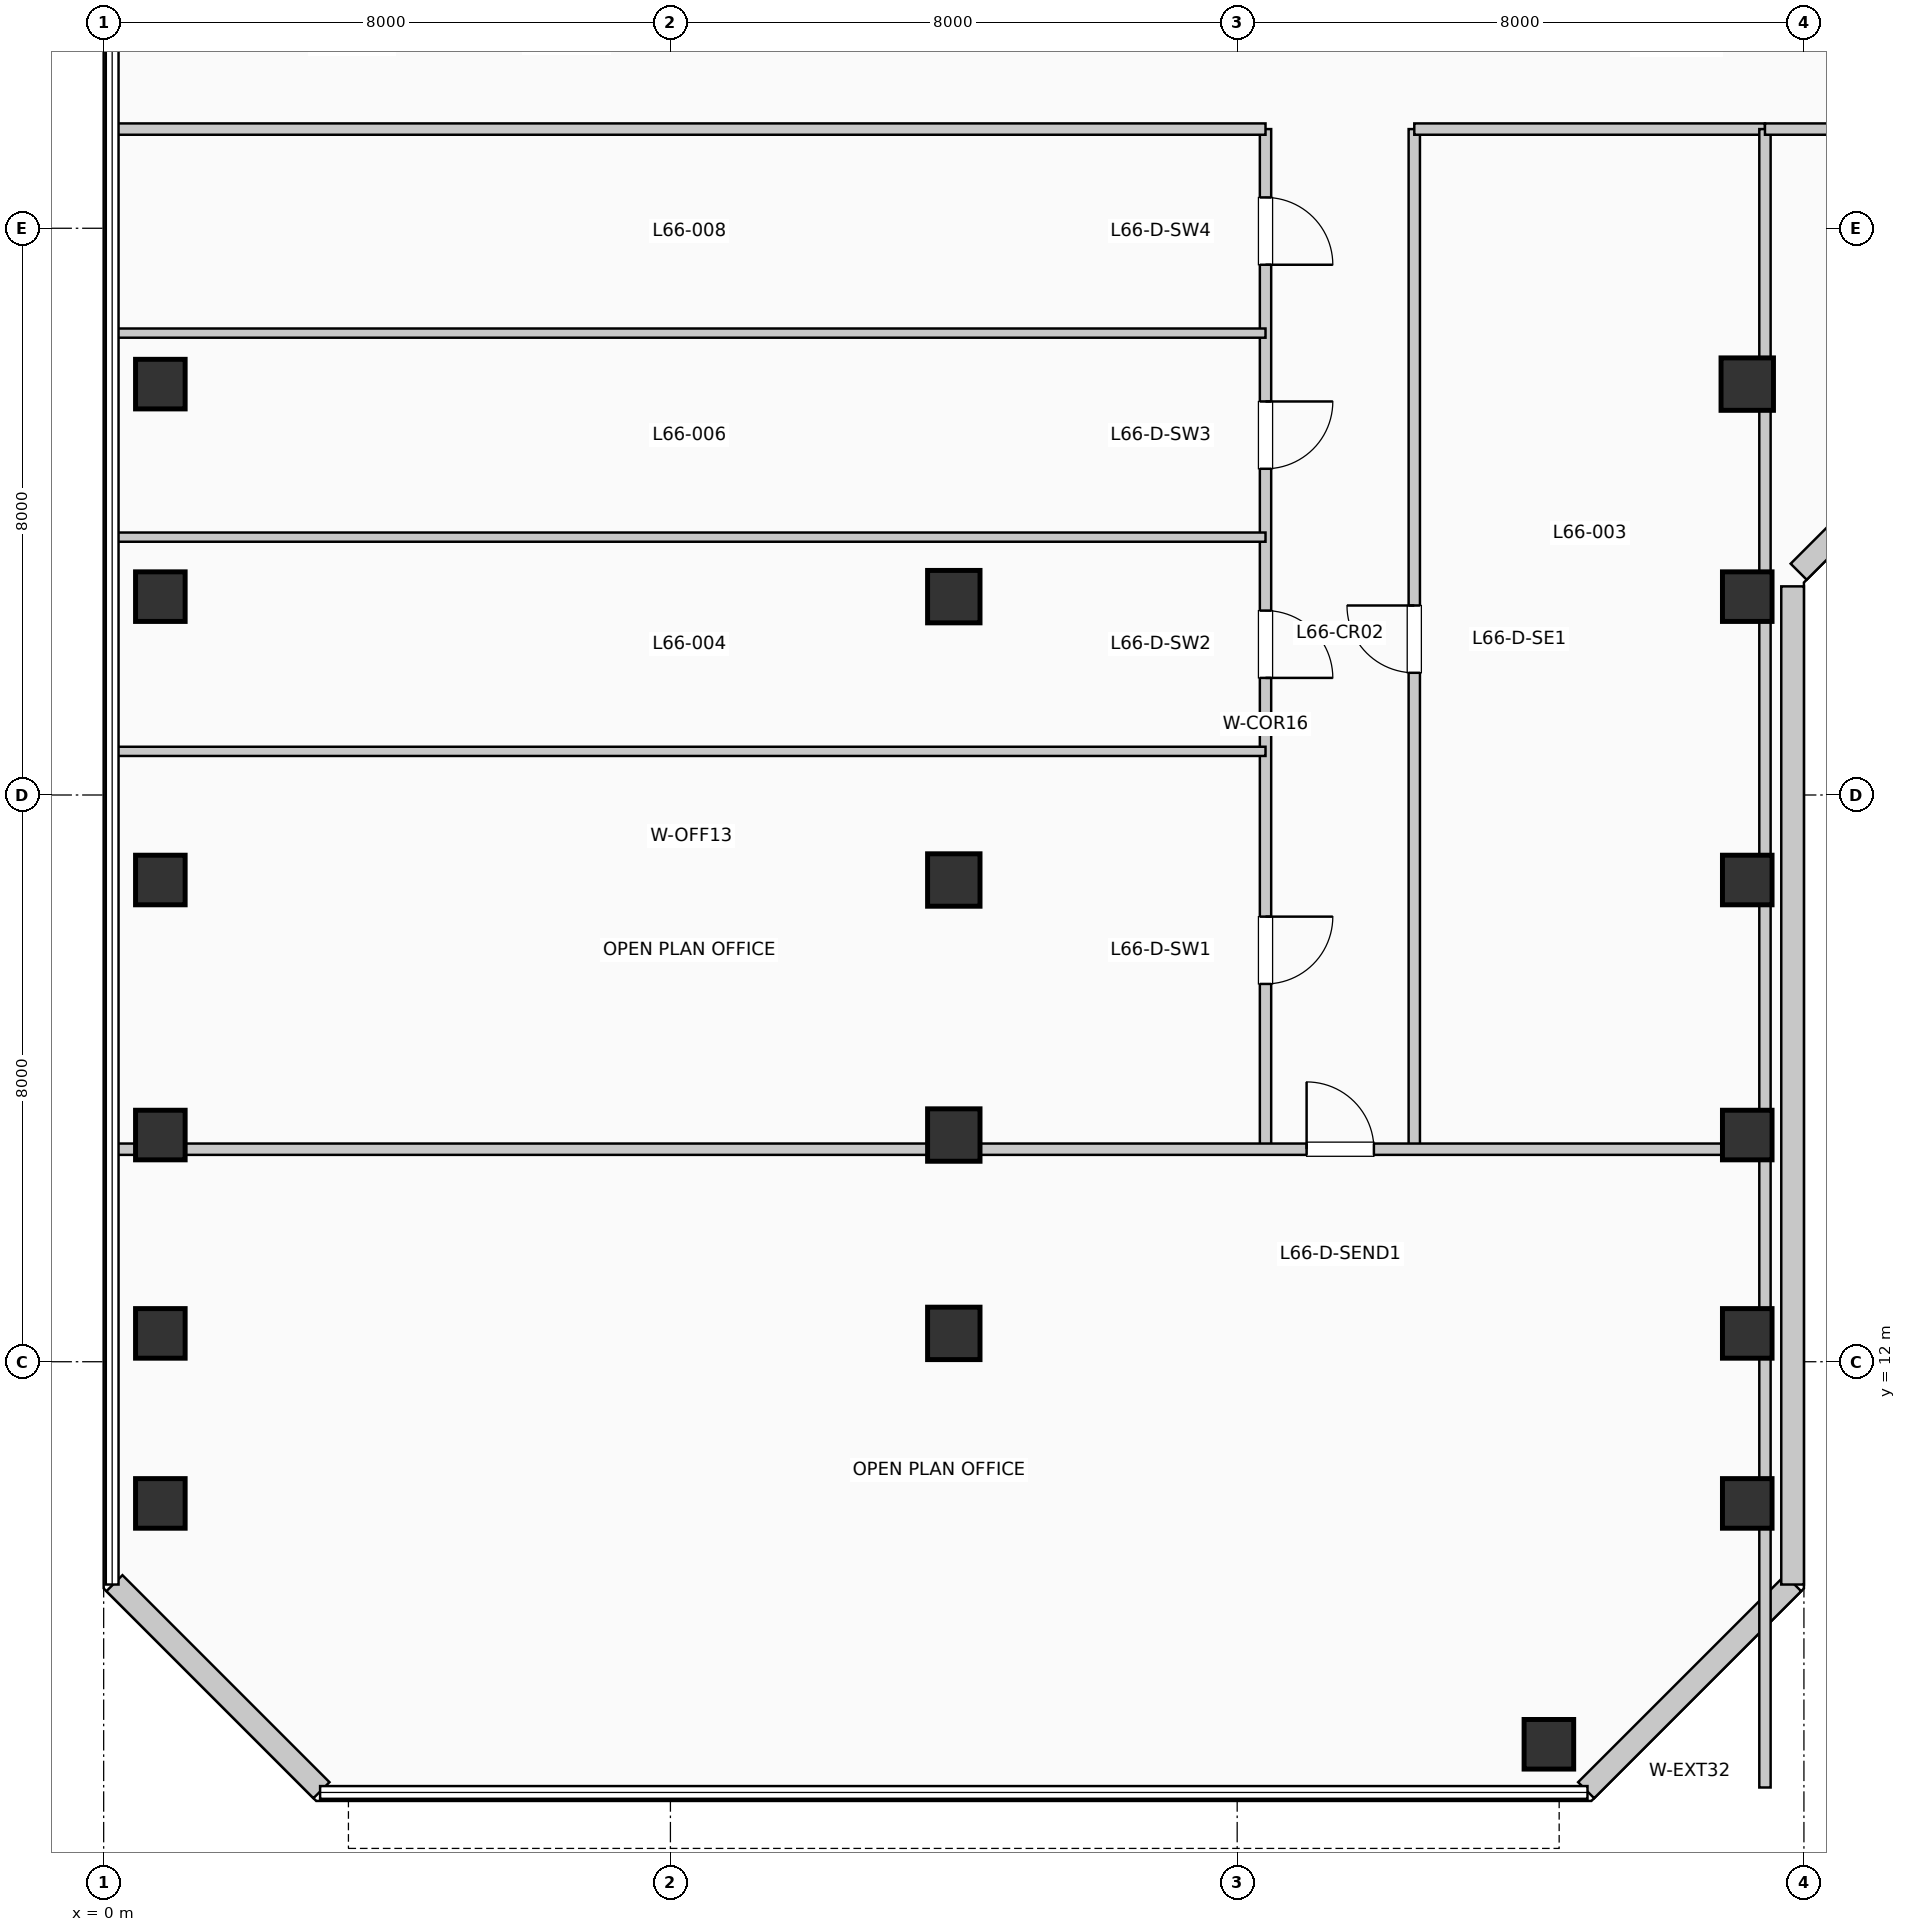
"""IFC4 building model, lengths in metres.
Left out: names, types, materials, properties, quantities, classifications, styles, units other than length and angle.
Written with IfcOpenShell. Run it as: python <this file> out.ifc"""

import sys

from ifc_helpers import new_model, si_unit, direction, frame, frame_2d, origin, origin_2d, place, context, subcontext, project, spatial, rectangle, extrude, element, fill, save


model = new_model("IFC4")
c1 = context("Model", 3, precision=1e-05, world=origin(), true_north=direction((0.0, 1.0)))
c2 = subcontext(c1, "Body", "Model", "MODEL_VIEW")
j1 = project(units=[si_unit("LENGTHUNIT", "METRE"), si_unit("PLANEANGLEUNIT", "RADIAN")], contexts=[c1])
p1 = place(None, origin())
s1 = spatial("IfcSite", under=j1, at=p1, CompositionType="ELEMENT")
p2 = place(p1, origin())
s2 = spatial("IfcBuilding", under=s1, at=p2, CompositionType="ELEMENT")
p3 = place(p2, frame((0.0, 0.0, 272.25)))
s3 = spatial("IfcBuildingStorey", under=s2, at=p3, CompositionType="ELEMENT", Elevation=272.25)
for number, where, z_axis, x_axis in (
    (1, (0.8, 10.0, 0.0), (0.0, 0.0, 1.0), (1.0, 0.0, 0.0)),
    (2, (0.8, 12.4, 0.0), (0.0, 0.0, 1.0), (1.0, 0.0, 0.0)),
    (3, (0.8, 15.2, 0.0), (0.0, 0.0, 1.0), (1.0, 0.0, 0.0)),
    (4, (0.8, 18.8, 0.0), (0.0, 0.0, 1.0), (1.0, 0.0, 0.0)),
    (5, (0.8, 22.8, 0.0), (0.0, 0.0, 1.0), (1.0, 0.0, 0.0)),
    (6, (0.8, 25.8, 0.0), (0.0, 0.0, 1.0), (1.0, 0.0, 0.0)),
):
    element("IfcColumn", number, at=place(p3, frame(where, z_axis=z_axis, x_axis=x_axis)), inside=s3, PredefinedType="COLUMN", context=c2, shape_type="SweptSolid", body=[
        extrude(rectangle(XDim=0.7, YDim=0.7, at=origin_2d()), origin(), (0.0, 0.0, 1.0), 3.96),
    ])
for number, where, z_axis, x_axis in (
    (7, (12.0, 12.4, 0.0), (0.0, 0.0, 1.0), (1.0, 0.0, 0.0)),
    (8, (12.0, 15.2, 0.0), (0.0, 0.0, 1.0), (1.0, 0.0, 0.0)),
    (9, (12.0, 18.8, 0.0), (0.0, 0.0, 1.0), (1.0, 0.0, 0.0)),
    (10, (12.0, 22.8, 0.0), (0.0, 0.0, 1.0), (1.0, 0.0, 0.0)),
):
    element("IfcColumn", number, at=place(p3, frame(where, z_axis=z_axis, x_axis=x_axis)), inside=s3, PredefinedType="COLUMN", context=c2, shape_type="SweptSolid", body=[
        extrude(rectangle(XDim=0.74, YDim=0.74, at=origin_2d()), origin(), (0.0, 0.0, 1.0), 3.96),
    ])
for number, where, z_axis, x_axis in (
    (11, (20.4, 6.6, 0.0), (0.0, 0.0, 1.0), (1.0, 0.0, 0.0)),
    (12, (23.2, 10.0, 0.0), (0.0, 0.0, 1.0), (1.0, 0.0, 0.0)),
    (13, (23.2, 12.4, 0.0), (0.0, 0.0, 1.0), (1.0, 0.0, 0.0)),
    (14, (23.2, 15.2, 0.0), (0.0, 0.0, 1.0), (1.0, 0.0, 0.0)),
    (15, (23.2, 18.8, 0.0), (0.0, 0.0, 1.0), (1.0, 0.0, 0.0)),
    (16, (23.2, 22.8, 0.0), (0.0, 0.0, 1.0), (1.0, 0.0, 0.0)),
):
    element("IfcColumn", number, at=place(p3, frame(where, z_axis=z_axis, x_axis=x_axis)), inside=s3, PredefinedType="COLUMN", context=c2, shape_type="SweptSolid", body=[
        extrude(rectangle(XDim=0.7, YDim=0.7, at=origin_2d()), origin(), (0.0, 0.0, 1.0), 3.96),
    ])
p4 = place(p3, frame((23.2, 25.8, 0.0), z_axis=(0.0, 0.0, 1.0), x_axis=(1.0, 0.0, 0.0)))
e17 = element("IfcColumn", 17, at=p4, inside=s3, PredefinedType="COLUMN", context=c2, shape_type="SweptSolid", body=[
    extrude(rectangle(XDim=0.74, YDim=0.74, at=origin_2d()), origin(), (0.0, 0.0, 1.0), 3.96),
])
p5 = place(p3, frame((20.926, 5.952, 0.0), z_axis=(0.0, 0.0, 1.0), x_axis=(0.707077242712, 0.707136318428, 0.0)))
e18 = element("IfcWall", 18, at=p5, inside=s3, PredefinedType="SOLIDWALL", context=c2, shape_type="SweptSolid", body=[
    extrude(rectangle(XDim=4.133, YDim=0.32, at=frame_2d((2.066, 0.0))), origin(), (0.0, 0.0, 1.0), 3.74),
])
p6 = place(p3, frame((23.84, 8.855, 0.0), z_axis=(0.0, 0.0, 1.0), x_axis=(0.0, 1.0, 0.0)))
e19 = element("IfcWall", 19, at=p6, inside=s3, PredefinedType="SOLIDWALL", context=c2, shape_type="SweptSolid", body=[
    extrude(rectangle(XDim=14.09, YDim=0.32, at=frame_2d((7.045, 0.0))), origin(), (0.0, 0.0, 1.0), 3.74),
])
p7 = place(p3, frame((23.926, 23.152, 0.0), z_axis=(0.0, 0.0, 1.0), x_axis=(0.707106781187, 0.707106781187, 0.0)))
e20 = element("IfcWall", 20, at=p7, inside=s3, PredefinedType="SOLIDWALL", context=c2, shape_type="SweptSolid", body=[
    extrude(rectangle(XDim=2.718, YDim=0.32, at=frame_2d((1.359, 0.0))), origin(), (0.0, 0.0, 1.0), 3.74),
])
p8 = place(p3, frame((0.152, 8.874, 0.0), z_axis=(0.0, 0.0, 1.0), x_axis=(0.707077242712, -0.707136318428, 0.0)))
e21 = element("IfcWall", 21, at=p8, inside=s3, PredefinedType="SOLIDWALL", context=c2, shape_type="SweptSolid", body=[
    extrude(rectangle(XDim=4.133, YDim=0.32, at=frame_2d((2.066, 0.0))), origin(), (0.0, 0.0, 1.0), 3.74),
])
p9 = place(p3, frame((16.4, 15.0, 0.0), z_axis=(0.0, 0.0, 1.0), x_axis=(0.0, 1.0, 0.0)))
e22 = element("IfcWall", 22, at=p9, inside=s3, PredefinedType="PARTITIONING", context=c2, shape_type="SweptSolid", body=[
    extrude(rectangle(XDim=14.4, YDim=0.16, at=frame_2d((7.2, 0.0))), origin(), (0.0, 0.0, 1.0), 3.74),
])
p10 = place(p9, frame((3.283, 0.0, 0.0), z_axis=(0.0, 0.0, 1.0), x_axis=(-1.0, 0.0, 0.0)))
e23 = element("IfcOpeningElement", 23, at=p10, cuts=e22, PredefinedType="OPENING", context=c2, shape_type="SweptSolid", body=[
    extrude(rectangle(XDim=0.95, YDim=2.15, at=frame_2d((0.475, 1.075))), frame((0.0, 0.09, 0.0), z_axis=(0.0, -1.0, 0.0), x_axis=(1.0, 0.0, 0.0)), (0.0, 0.0, 1.0), 0.18),
])
p11 = place(p9, frame((7.603, 0.0, 0.0), z_axis=(0.0, 0.0, 1.0), x_axis=(-1.0, 0.0, 0.0)))
e24 = element("IfcOpeningElement", 24, at=p11, cuts=e22, PredefinedType="OPENING", context=c2, shape_type="SweptSolid", body=[
    extrude(rectangle(XDim=0.95, YDim=2.15, at=frame_2d((0.475, 1.075))), frame((0.0, 0.09, 0.0), z_axis=(0.0, -1.0, 0.0), x_axis=(1.0, 0.0, 0.0)), (0.0, 0.0, 1.0), 0.18),
])
p12 = place(p9, frame((10.555, 0.0, 0.0), z_axis=(0.0, 0.0, 1.0), x_axis=(-1.0, 0.0, 0.0)))
e25 = element("IfcOpeningElement", 25, at=p12, cuts=e22, PredefinedType="OPENING", context=c2, shape_type="SweptSolid", body=[
    extrude(rectangle(XDim=0.95, YDim=2.15, at=frame_2d((0.475, 1.075))), frame((0.0, 0.09, 0.0), z_axis=(0.0, -1.0, 0.0), x_axis=(1.0, 0.0, 0.0)), (0.0, 0.0, 1.0), 0.18),
])
p13 = place(p9, frame((13.435, 0.0, 0.0), z_axis=(0.0, 0.0, 1.0), x_axis=(-1.0, 0.0, 0.0)))
e26 = element("IfcOpeningElement", 26, at=p13, cuts=e22, PredefinedType="OPENING", context=c2, shape_type="SweptSolid", body=[
    extrude(rectangle(XDim=0.95, YDim=2.15, at=frame_2d((0.475, 1.075))), frame((0.0, 0.09, 0.0), z_axis=(0.0, -1.0, 0.0), x_axis=(1.0, 0.0, 0.0)), (0.0, 0.0, 1.0), 0.18),
])
p14 = place(p3, frame((18.5, 15.0, 0.0), z_axis=(0.0, 0.0, 1.0), x_axis=(0.0, 1.0, 0.0)))
e27 = element("IfcWall", 27, at=p14, inside=s3, PredefinedType="PARTITIONING", context=c2, shape_type="SweptSolid", body=[
    extrude(rectangle(XDim=14.4, YDim=0.16, at=frame_2d((7.2, 0.0))), origin(), (0.0, 0.0, 1.0), 3.74),
])
p15 = place(p14, frame((6.725, 0.0, 0.0)))
e28 = element("IfcOpeningElement", 28, at=p15, cuts=e27, PredefinedType="OPENING", context=c2, shape_type="SweptSolid", body=[
    extrude(rectangle(XDim=0.95, YDim=2.15, at=frame_2d((0.475, 1.075))), frame((0.0, 0.09, 0.0), z_axis=(0.0, -1.0, 0.0), x_axis=(1.0, 0.0, 0.0)), (0.0, 0.0, 1.0), 0.18),
])
p16 = place(p3, frame((0.19, 15.0, 0.0), z_axis=(0.0, 0.0, 1.0), x_axis=(1.0, 0.0, 0.0)))
e29 = element("IfcWall", 29, at=p16, inside=s3, PredefinedType="PARTITIONING", context=c2, shape_type="SweptSolid", body=[
    extrude(rectangle(XDim=23.26, YDim=0.16, at=frame_2d((11.63, 0.0))), origin(), (0.0, 0.0, 1.0), 3.175),
])
p17 = place(p16, frame((16.79, 0.0, 0.0)))
e30 = element("IfcOpeningElement", 30, at=p17, cuts=e29, PredefinedType="OPENING", context=c2, shape_type="SweptSolid", body=[
    extrude(rectangle(XDim=0.95, YDim=2.15, at=frame_2d((0.475, 1.075))), frame((0.0, 0.09, 0.0), z_axis=(0.0, -1.0, 0.0), x_axis=(1.0, 0.0, 0.0)), (0.0, 0.0, 1.0), 0.18),
])
p18 = place(p3, frame((0.19, 29.4, 0.0), z_axis=(0.0, 0.0, 1.0), x_axis=(1.0, 0.0, 0.0)))
e31 = element("IfcWall", 31, at=p18, inside=s3, PredefinedType="PARTITIONING", context=c2, shape_type="SweptSolid", body=[
    extrude(rectangle(XDim=16.21, YDim=0.16, at=frame_2d((8.105, 0.0))), origin(), (0.0, 0.0, 1.0), 3.425),
])
p19 = place(p3, frame((18.5, 29.4, 0.0), z_axis=(0.0, 0.0, 1.0), x_axis=(1.0, 0.0, 0.0)))
e32 = element("IfcWall", 32, at=p19, inside=s3, PredefinedType="PARTITIONING", context=c2, shape_type="SweptSolid", body=[
    extrude(rectangle(XDim=4.95, YDim=0.16, at=frame_2d((2.475, 0.0))), origin(), (0.0, 0.0, 1.0), 3.425),
])
p20 = place(p3, frame((23.45, 5.99, 0.0), z_axis=(0.0, 0.0, 1.0), x_axis=(0.0, 1.0, 0.0)))
e33 = element("IfcWall", 33, at=p20, inside=s3, PredefinedType="PARTITIONING", context=c2, shape_type="SweptSolid", body=[
    extrude(rectangle(XDim=23.41, YDim=0.16, at=frame_2d((11.705, 0.0))), origin(), (0.0, 0.0, 1.0), 3.175),
])
for number, where, z_axis, x_axis in (
    (34, (0.19, 20.616, 0.0), (0.0, 0.0, 1.0), (1.0, 0.0, 0.0)),
    (35, (0.19, 23.64, 0.0), (0.0, 0.0, 1.0), (1.0, 0.0, 0.0)),
    (36, (0.19, 26.52, 0.0), (0.0, 0.0, 1.0), (1.0, 0.0, 0.0)),
):
    element("IfcWall", number, at=place(p3, frame(where, z_axis=z_axis, x_axis=x_axis)), inside=s3, PredefinedType="PARTITIONING", context=c2, shape_type="SweptSolid", body=[
        extrude(rectangle(XDim=16.21, YDim=0.13, at=frame_2d((8.105, 0.0))), origin(), (0.0, 0.0, 1.0), 3.74),
    ])
p21 = place(p3, frame((23.45, 29.4, 0.0), z_axis=(0.0, 0.0, 1.0), x_axis=(1.0, 0.0, 0.0)))
e37 = element("IfcWall", 37, at=p21, inside=s3, PredefinedType="PARTITIONING", context=c2, shape_type="SweptSolid", body=[
    extrude(rectangle(XDim=20.76, YDim=0.16, at=frame_2d((10.38, 0.0))), origin(), (0.0, 0.0, 1.0), 3.425),
])
p22 = place(p21, frame((10.855, 0.0, 0.0), z_axis=(0.0, 0.0, 1.0), x_axis=(-1.0, 0.0, 0.0)))
e38 = element("IfcOpeningElement", 38, at=p22, cuts=e37, PredefinedType="OPENING", context=c2, shape_type="SweptSolid", body=[
    extrude(rectangle(XDim=0.95, YDim=2.15, at=frame_2d((0.475, 1.075))), frame((0.0, 0.09, 0.0), z_axis=(0.0, -1.0, 0.0), x_axis=(1.0, 0.0, 0.0)), (0.0, 0.0, 1.0), 0.18),
])
p23 = place(p17, origin())
e39 = element("IfcDoor", 39, at=p23, inside=s3, OperationType="SINGLE_SWING_LEFT", PredefinedType="DOOR", context=c2, shape_type="SweptSolid", body=[
    extrude(rectangle(XDim=0.95, YDim=2.15, at=frame_2d((0.475, 1.075))), frame((0.0, 0.025, 0.0), z_axis=(0.0, -1.0, 0.0), x_axis=(1.0, 0.0, 0.0)), (0.0, 0.0, 1.0), 0.05),
])
fill(e30, e39)
p24 = place(p10, origin())
e40 = element("IfcDoor", 40, at=p24, inside=s3, OperationType="SINGLE_SWING_RIGHT", PredefinedType="DOOR", context=c2, shape_type="SweptSolid", body=[
    extrude(rectangle(XDim=0.95, YDim=2.15, at=frame_2d((0.475, 1.075))), frame((0.0, 0.025, 0.0), z_axis=(0.0, -1.0, 0.0), x_axis=(1.0, 0.0, 0.0)), (0.0, 0.0, 1.0), 0.05),
])
fill(e23, e40)
p25 = place(p11, origin())
e41 = element("IfcDoor", 41, at=p25, inside=s3, OperationType="SINGLE_SWING_LEFT", PredefinedType="DOOR", context=c2, shape_type="SweptSolid", body=[
    extrude(rectangle(XDim=0.95, YDim=2.15, at=frame_2d((0.475, 1.075))), frame((0.0, 0.025, 0.0), z_axis=(0.0, -1.0, 0.0), x_axis=(1.0, 0.0, 0.0)), (0.0, 0.0, 1.0), 0.05),
])
fill(e24, e41)
p26 = place(p12, origin())
e42 = element("IfcDoor", 42, at=p26, inside=s3, OperationType="SINGLE_SWING_RIGHT", PredefinedType="DOOR", context=c2, shape_type="SweptSolid", body=[
    extrude(rectangle(XDim=0.95, YDim=2.15, at=frame_2d((0.475, 1.075))), frame((0.0, 0.025, 0.0), z_axis=(0.0, -1.0, 0.0), x_axis=(1.0, 0.0, 0.0)), (0.0, 0.0, 1.0), 0.05),
])
fill(e25, e42)
p27 = place(p13, origin())
e43 = element("IfcDoor", 43, at=p27, inside=s3, OperationType="SINGLE_SWING_LEFT", PredefinedType="DOOR", context=c2, shape_type="SweptSolid", body=[
    extrude(rectangle(XDim=0.95, YDim=2.15, at=frame_2d((0.475, 1.075))), frame((0.0, 0.025, 0.0), z_axis=(0.0, -1.0, 0.0), x_axis=(1.0, 0.0, 0.0)), (0.0, 0.0, 1.0), 0.05),
])
fill(e26, e43)
p28 = place(p15, origin())
e44 = element("IfcDoor", 44, at=p28, inside=s3, OperationType="SINGLE_SWING_RIGHT", PredefinedType="DOOR", context=c2, shape_type="SweptSolid", body=[
    extrude(rectangle(XDim=0.95, YDim=2.15, at=frame_2d((0.475, 1.075))), frame((0.0, 0.025, 0.0), z_axis=(0.0, -1.0, 0.0), x_axis=(1.0, 0.0, 0.0)), (0.0, 0.0, 1.0), 0.05),
])
fill(e28, e44)
save(model, sys.argv[1])
